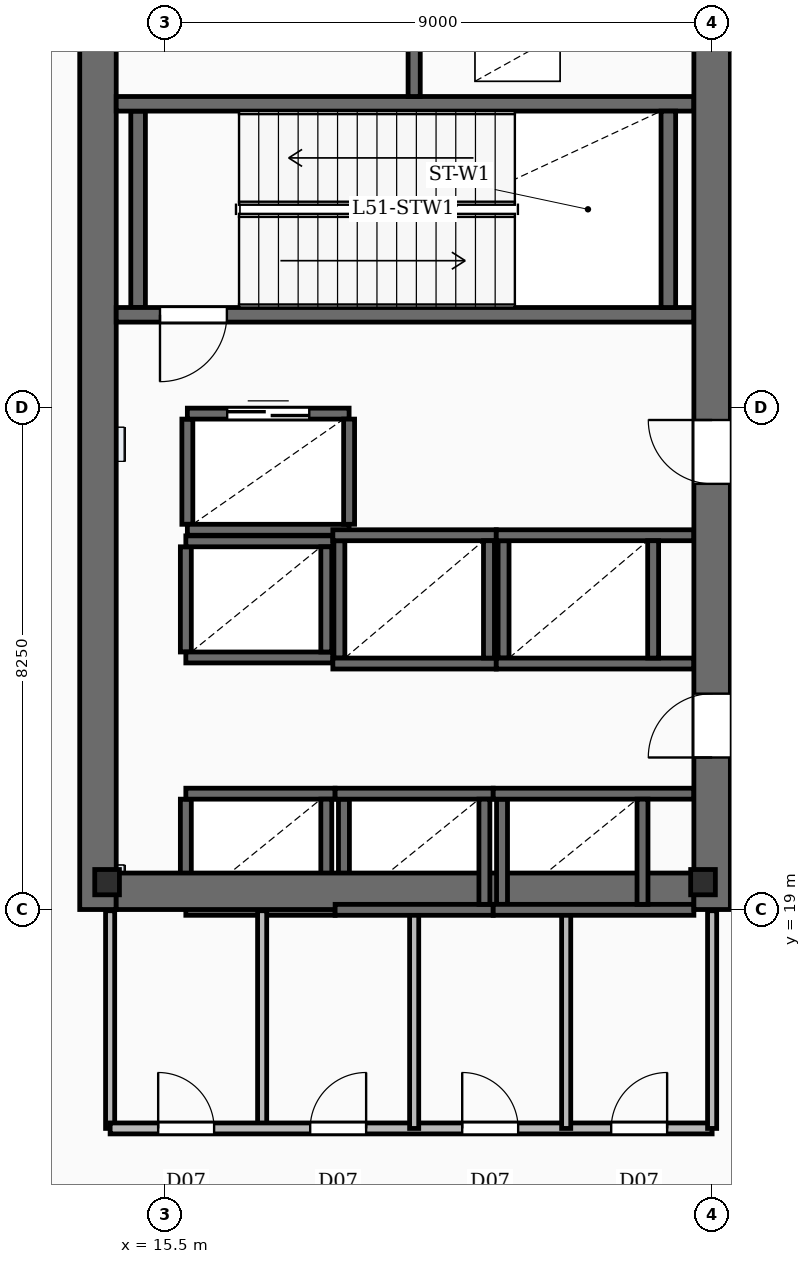
"""IFC4 building model, lengths in metres.
Left out: names, types, materials, properties, quantities, classifications, styles, units other than length and angle.
Written with IfcOpenShell. Run it as: python <this file> out.ifc"""

import sys

from ifc_helpers import new_model, si_unit, direction, frame, frame_2d, origin, origin_2d, place, context, subcontext, project, spatial, rectangle, i_section, extrude, element, fill, save


model = new_model("IFC4")
c1 = context("Model", 3, precision=1e-05, world=origin(), true_north=direction((0.0, 1.0)))
c2 = subcontext(c1, "Body", "Model", "MODEL_VIEW")
j1 = project(units=[si_unit("LENGTHUNIT", "METRE"), si_unit("PLANEANGLEUNIT", "RADIAN")], contexts=[c1])
p1 = place(None, origin())
s1 = spatial("IfcSite", under=j1, at=p1, CompositionType="ELEMENT")
p2 = place(p1, origin())
s2 = spatial("IfcBuilding", under=s1, at=p2, CompositionType="ELEMENT")
p3 = place(p2, frame((0.0, 0.0, 210.95)))
s3 = spatial("IfcBuildingStorey", under=s2, at=p3, CompositionType="ELEMENT", Elevation=210.95)
p4 = place(p3, frame((14.4, 19.0, -0.42), z_axis=(0.0, 0.0, 1.0), x_axis=(0.0, 1.0, 0.0)))
e1 = element("IfcWall", 1, at=p4, inside=s3, PredefinedType="SHEAR", context=c2, shape_type="SweptSolid", body=[
    extrude(rectangle(XDim=15.3, YDim=0.6, at=frame_2d((7.65, 0.0))), origin(), (0.0, 0.0, 1.0), 5.17),
])
p5 = place(p3, frame((24.5, 19.0, -0.42), z_axis=(0.0, 0.0, 1.0), x_axis=(0.0, 1.0, 0.0)))
e2 = element("IfcWall", 2, at=p5, inside=s3, PredefinedType="SHEAR", context=c2, shape_type="SweptSolid", body=[
    extrude(rectangle(XDim=15.3, YDim=0.6, at=frame_2d((7.65, 0.0))), origin(), (0.0, 0.0, 1.0), 5.17),
])
p6 = place(p5, frame((2.5, 0.0, 0.42)))
e3 = element("IfcOpeningElement", 3, at=p6, cuts=e2, PredefinedType="OPENING", context=c2, shape_type="SweptSolid", body=[
    extrude(rectangle(XDim=1.05, YDim=2.15, at=frame_2d((0.525, 1.075))), frame((0.0, 0.31, 0.0), z_axis=(0.0, -1.0, 0.0), x_axis=(1.0, 0.0, 0.0)), (0.0, 0.0, 1.0), 0.62),
])
p7 = place(p5, frame((7.0, 0.0, 0.42)))
e4 = element("IfcOpeningElement", 4, at=p7, cuts=e2, PredefinedType="OPENING", context=c2, shape_type="SweptSolid", body=[
    extrude(rectangle(XDim=1.05, YDim=2.15, at=frame_2d((0.525, 1.075))), frame((0.0, 0.31, 0.0), z_axis=(0.0, -1.0, 0.0), x_axis=(1.0, 0.0, 0.0)), (0.0, 0.0, 1.0), 0.62),
])
p8 = place(p3, frame((14.7, 19.3, -0.42), z_axis=(0.0, 0.0, 1.0), x_axis=(1.0, 0.0, 0.0)))
e5 = element("IfcWall", 5, at=p8, inside=s3, PredefinedType="SHEAR", context=c2, shape_type="SweptSolid", body=[
    extrude(rectangle(XDim=9.5, YDim=0.6, at=frame_2d((4.75, 0.0))), origin(), (0.0, 0.0, 1.0), 5.17),
])
for number, where, z_axis, x_axis in (
    (6, (14.55, 19.45, -0.42), (0.0, 0.0, 1.0), (1.0, 0.0, 0.0)),
    (7, (24.35, 19.45, -0.42), (0.0, 0.0, 1.0), (1.0, 0.0, 0.0)),
):
    element("IfcColumn", number, at=place(p3, frame(where, z_axis=z_axis, x_axis=x_axis)), inside=s3, PredefinedType="COLUMN", context=c2, shape_type="SweptSolid", body=[
        extrude(i_section(OverallWidth=0.406, OverallDepth=0.416, WebThickness=0.03, FlangeThickness=0.048, FilletRadius=0.02, at=origin_2d()), origin(), (0.0, 0.0, 1.0), 5.17),
    ])
p9 = place(p3, frame((24.2, 28.78, 0.0), z_axis=(0.0, 0.0, 1.0), x_axis=(-1.0, 0.0, 0.0)))
e8 = element("IfcWall", 8, at=p9, inside=s3, PredefinedType="SOLIDWALL", context=c2, shape_type="SweptSolid", body=[
    extrude(rectangle(XDim=9.5, YDim=0.24, at=frame_2d((4.75, 0.0))), origin(), (0.0, 0.0, 1.0), 4.75),
])
p10 = place(p9, frame((7.68, 0.0, 0.0)))
e9 = element("IfcOpeningElement", 9, at=p10, cuts=e8, PredefinedType="OPENING", context=c2, shape_type="SweptSolid", body=[
    extrude(rectangle(XDim=1.1, YDim=2.15, at=frame_2d((0.55, 1.075))), frame((0.0, 0.13, 0.0), z_axis=(0.0, -1.0, 0.0), x_axis=(1.0, 0.0, 0.0)), (0.0, 0.0, 1.0), 0.26),
])
p11 = place(p3, frame((14.7, 32.25, 0.0), z_axis=(0.0, 0.0, 1.0), x_axis=(1.0, 0.0, 0.0)))
e10 = element("IfcWall", 10, at=p11, inside=s3, PredefinedType="SOLIDWALL", context=c2, shape_type="SweptSolid", body=[
    extrude(rectangle(XDim=9.5, YDim=0.24, at=frame_2d((4.75, 0.0))), origin(), (0.0, 0.0, 1.0), 4.75),
])
for number, where, z_axis, x_axis in (
    (11, (15.06, 28.9, 0.0), (0.0, 0.0, 1.0), (0.0, 1.0, 0.0)),
    (12, (23.78, 28.9, 0.0), (0.0, 0.0, 1.0), (0.0, 1.0, 0.0)),
):
    element("IfcWall", number, at=place(p3, frame(where, z_axis=z_axis, x_axis=x_axis)), inside=s3, PredefinedType="SOLIDWALL", context=c2, shape_type="SweptSolid", body=[
        extrude(rectangle(XDim=3.23, YDim=0.24, at=frame_2d((1.615, 0.0))), origin(), (0.0, 0.0, 1.0), 4.75),
    ])
p12 = place(p3, frame((19.6, 32.37, 0.0), z_axis=(0.0, 0.0, 1.0), x_axis=(0.0, 1.0, 0.0)))
e13 = element("IfcWall", 13, at=p12, inside=s3, PredefinedType="SOLIDWALL", context=c2, shape_type="SweptSolid", body=[
    extrude(rectangle(XDim=1.28, YDim=0.2, at=frame_2d((0.64, 0.0))), origin(), (0.0, 0.0, 1.0), 4.75),
])
for number, where, z_axis, x_axis in (
    (14, (15.845, 20.905, 0.0), (0.0, 0.0, 1.0), (1.0, 0.0, 0.0)),
    (15, (15.845, 18.995, 0.0), (0.0, 0.0, 1.0), (1.0, 0.0, 0.0)),
):
    element("IfcWall", number, at=place(p3, frame(where, z_axis=z_axis, x_axis=x_axis)), inside=s3, PredefinedType="SOLIDWALL", context=c2, shape_type="SweptSolid", body=[
        extrude(rectangle(XDim=2.455, YDim=0.18, at=frame_2d((1.228, 0.0))), origin(), (0.0, 0.0, 1.0), 4.75),
    ])
for number, where, z_axis, x_axis in (
    (16, (15.845, 19.085, 0.0), (0.0, 0.0, 1.0), (0.0, 1.0, 0.0)),
    (17, (18.155, 19.085, 0.0), (0.0, 0.0, 1.0), (0.0, 1.0, 0.0)),
):
    element("IfcWall", number, at=place(p3, frame(where, z_axis=z_axis, x_axis=x_axis)), inside=s3, PredefinedType="SOLIDWALL", context=c2, shape_type="SweptSolid", body=[
        extrude(rectangle(XDim=1.73, YDim=0.18, at=frame_2d((0.865, 0.0))), origin(), (0.0, 0.0, 1.0), 4.75),
    ])
for number, where, z_axis, x_axis in (
    (18, (18.3, 20.905, 0.0), (0.0, 0.0, 1.0), (1.0, 0.0, 0.0)),
    (19, (18.3, 18.995, 0.0), (0.0, 0.0, 1.0), (1.0, 0.0, 0.0)),
):
    element("IfcWall", number, at=place(p3, frame(where, z_axis=z_axis, x_axis=x_axis)), inside=s3, PredefinedType="SOLIDWALL", context=c2, shape_type="SweptSolid", body=[
        extrude(rectangle(XDim=2.6, YDim=0.18, at=frame_2d((1.3, 0.0))), origin(), (0.0, 0.0, 1.0), 4.75),
    ])
for number, where, z_axis, x_axis in (
    (20, (18.445, 19.085, 0.0), (0.0, 0.0, 1.0), (0.0, 1.0, 0.0)),
    (21, (20.755, 19.085, 0.0), (0.0, 0.0, 1.0), (0.0, 1.0, 0.0)),
):
    element("IfcWall", number, at=place(p3, frame(where, z_axis=z_axis, x_axis=x_axis)), inside=s3, PredefinedType="SOLIDWALL", context=c2, shape_type="SweptSolid", body=[
        extrude(rectangle(XDim=1.73, YDim=0.18, at=frame_2d((0.865, 0.0))), origin(), (0.0, 0.0, 1.0), 4.75),
    ])
for number, where, z_axis, x_axis in (
    (22, (20.9, 20.905, 0.0), (0.0, 0.0, 1.0), (1.0, 0.0, 0.0)),
    (23, (20.9, 18.995, 0.0), (0.0, 0.0, 1.0), (1.0, 0.0, 0.0)),
):
    element("IfcWall", number, at=place(p3, frame(where, z_axis=z_axis, x_axis=x_axis)), inside=s3, PredefinedType="SOLIDWALL", context=c2, shape_type="SweptSolid", body=[
        extrude(rectangle(XDim=3.3, YDim=0.18, at=frame_2d((1.65, 0.0))), origin(), (0.0, 0.0, 1.0), 4.75),
    ])
for number, where, z_axis, x_axis in (
    (24, (21.045, 19.085, 0.0), (0.0, 0.0, 1.0), (0.0, 1.0, 0.0)),
    (25, (23.355, 19.085, 0.0), (0.0, 0.0, 1.0), (0.0, 1.0, 0.0)),
):
    element("IfcWall", number, at=place(p3, frame(where, z_axis=z_axis, x_axis=x_axis)), inside=s3, PredefinedType="SOLIDWALL", context=c2, shape_type="SweptSolid", body=[
        extrude(rectangle(XDim=1.73, YDim=0.18, at=frame_2d((0.865, 0.0))), origin(), (0.0, 0.0, 1.0), 4.75),
    ])
for number, where, z_axis, x_axis in (
    (26, (15.845, 25.055, 0.0), (0.0, 0.0, 1.0), (1.0, 0.0, 0.0)),
    (27, (15.845, 23.145, 0.0), (0.0, 0.0, 1.0), (1.0, 0.0, 0.0)),
):
    element("IfcWall", number, at=place(p3, frame(where, z_axis=z_axis, x_axis=x_axis)), inside=s3, PredefinedType="SOLIDWALL", context=c2, shape_type="SweptSolid", body=[
        extrude(rectangle(XDim=2.417, YDim=0.18, at=frame_2d((1.209, 0.0))), origin(), (0.0, 0.0, 1.0), 4.75),
    ])
for number, where, z_axis, x_axis in (
    (28, (15.845, 23.235, 0.0), (0.0, 0.0, 1.0), (0.0, 1.0, 0.0)),
    (29, (18.155, 23.235, 0.0), (0.0, 0.0, 1.0), (0.0, 1.0, 0.0)),
):
    element("IfcWall", number, at=place(p3, frame(where, z_axis=z_axis, x_axis=x_axis)), inside=s3, PredefinedType="SOLIDWALL", context=c2, shape_type="SweptSolid", body=[
        extrude(rectangle(XDim=1.73, YDim=0.18, at=frame_2d((0.865, 0.0))), origin(), (0.0, 0.0, 1.0), 4.75),
    ])
for number, where, z_axis, x_axis in (
    (30, (18.262, 25.155, 0.0), (0.0, 0.0, 1.0), (1.0, 0.0, 0.0)),
    (31, (18.262, 23.045, 0.0), (0.0, 0.0, 1.0), (1.0, 0.0, 0.0)),
):
    element("IfcWall", number, at=place(p3, frame(where, z_axis=z_axis, x_axis=x_axis)), inside=s3, PredefinedType="SOLIDWALL", context=c2, shape_type="SweptSolid", body=[
        extrude(rectangle(XDim=2.688, YDim=0.18, at=frame_2d((1.344, 0.0))), origin(), (0.0, 0.0, 1.0), 4.75),
    ])
for number, where, z_axis, x_axis in (
    (32, (18.37, 23.135, 0.0), (0.0, 0.0, 1.0), (0.0, 1.0, 0.0)),
    (33, (20.83, 23.135, 0.0), (0.0, 0.0, 1.0), (0.0, 1.0, 0.0)),
):
    element("IfcWall", number, at=place(p3, frame(where, z_axis=z_axis, x_axis=x_axis)), inside=s3, PredefinedType="SOLIDWALL", context=c2, shape_type="SweptSolid", body=[
        extrude(rectangle(XDim=1.93, YDim=0.18, at=frame_2d((0.965, 0.0))), origin(), (0.0, 0.0, 1.0), 4.75),
    ])
for number, where, z_axis, x_axis in (
    (34, (20.95, 25.155, 0.0), (0.0, 0.0, 1.0), (1.0, 0.0, 0.0)),
    (35, (20.95, 23.045, 0.0), (0.0, 0.0, 1.0), (1.0, 0.0, 0.0)),
):
    element("IfcWall", number, at=place(p3, frame(where, z_axis=z_axis, x_axis=x_axis)), inside=s3, PredefinedType="SOLIDWALL", context=c2, shape_type="SweptSolid", body=[
        extrude(rectangle(XDim=3.25, YDim=0.18, at=frame_2d((1.625, 0.0))), origin(), (0.0, 0.0, 1.0), 4.75),
    ])
for number, where, z_axis, x_axis in (
    (36, (21.07, 23.135, 0.0), (0.0, 0.0, 1.0), (0.0, 1.0, 0.0)),
    (37, (23.53, 23.135, 0.0), (0.0, 0.0, 1.0), (0.0, 1.0, 0.0)),
):
    element("IfcWall", number, at=place(p3, frame(where, z_axis=z_axis, x_axis=x_axis)), inside=s3, PredefinedType="SOLIDWALL", context=c2, shape_type="SweptSolid", body=[
        extrude(rectangle(XDim=1.93, YDim=0.18, at=frame_2d((0.965, 0.0))), origin(), (0.0, 0.0, 1.0), 4.75),
    ])
p13 = place(p3, frame((15.87, 27.155, 0.0), z_axis=(0.0, 0.0, 1.0), x_axis=(1.0, 0.0, 0.0)))
e38 = element("IfcWall", 38, at=p13, inside=s3, PredefinedType="SOLIDWALL", context=c2, shape_type="SweptSolid", body=[
    extrude(rectangle(XDim=2.66, YDim=0.18, at=frame_2d((1.33, 0.0))), origin(), (0.0, 0.0, 1.0), 4.75),
])
p14 = place(p13, frame((0.655, 0.0, 0.0)))
e39 = element("IfcOpeningElement", 39, at=p14, cuts=e38, PredefinedType="OPENING", context=c2, shape_type="SweptSolid", body=[
    extrude(rectangle(XDim=1.35, YDim=2.3, at=frame_2d((0.675, 1.15))), frame((0.0, 0.1, 0.0), z_axis=(0.0, -1.0, 0.0), x_axis=(1.0, 0.0, 0.0)), (0.0, 0.0, 1.0), 0.2),
])
p15 = place(p3, frame((15.87, 25.245, 0.0), z_axis=(0.0, 0.0, 1.0), x_axis=(1.0, 0.0, 0.0)))
e40 = element("IfcWall", 40, at=p15, inside=s3, PredefinedType="SOLIDWALL", context=c2, shape_type="SweptSolid", body=[
    extrude(rectangle(XDim=2.66, YDim=0.18, at=frame_2d((1.33, 0.0))), origin(), (0.0, 0.0, 1.0), 4.75),
])
for number, where, z_axis, x_axis in (
    (41, (15.87, 25.335, 0.0), (0.0, 0.0, 1.0), (0.0, 1.0, 0.0)),
    (42, (18.53, 25.335, 0.0), (0.0, 0.0, 1.0), (0.0, 1.0, 0.0)),
):
    element("IfcWall", number, at=place(p3, frame(where, z_axis=z_axis, x_axis=x_axis)), inside=s3, PredefinedType="SOLIDWALL", context=c2, shape_type="SweptSolid", body=[
        extrude(rectangle(XDim=1.73, YDim=0.18, at=frame_2d((0.865, 0.0))), origin(), (0.0, 0.0, 1.0), 4.75),
    ])
for number, where, z_axis, x_axis in (
    (43, (17.1, 15.4, 0.0), (0.0, 0.0, 1.0), (0.0, 1.0, 0.0)),
    (44, (19.6, 15.4, 0.0), (0.0, 0.0, 1.0), (0.0, 1.0, 0.0)),
    (45, (22.1, 15.4, 0.0), (0.0, 0.0, 1.0), (0.0, 1.0, 0.0)),
):
    element("IfcWall", number, at=place(p3, frame(where, z_axis=z_axis, x_axis=x_axis)), inside=s3, PredefinedType="PARTITIONING", context=c2, shape_type="SweptSolid", body=[
        extrude(rectangle(XDim=3.58, YDim=0.15, at=frame_2d((1.79, 0.0))), origin(), (0.0, 0.0, 1.0), 3.81),
    ])
p16 = place(p3, frame((14.6, 15.4, 0.0), z_axis=(0.0, 0.0, 1.0), x_axis=(1.0, 0.0, 0.0)))
e46 = element("IfcWall", 46, at=p16, inside=s3, PredefinedType="PARTITIONING", context=c2, shape_type="SweptSolid", body=[
    extrude(rectangle(XDim=9.9, YDim=0.18, at=frame_2d((4.95, 0.0))), origin(), (0.0, 0.0, 1.0), 3.81),
])
p17 = place(p16, frame((0.79, 0.0, 0.0)))
e47 = element("IfcOpeningElement", 47, at=p17, cuts=e46, PredefinedType="OPENING", context=c2, shape_type="SweptSolid", body=[
    extrude(rectangle(XDim=0.92, YDim=2.1, at=frame_2d((0.46, 1.05))), frame((0.0, 0.1, 0.0), z_axis=(0.0, -1.0, 0.0), x_axis=(1.0, 0.0, 0.0)), (0.0, 0.0, 1.0), 0.2),
])
p18 = place(p16, frame((3.29, 0.0, 0.0)))
e48 = element("IfcOpeningElement", 48, at=p18, cuts=e46, PredefinedType="OPENING", context=c2, shape_type="SweptSolid", body=[
    extrude(rectangle(XDim=0.92, YDim=2.1, at=frame_2d((0.46, 1.05))), frame((0.0, 0.1, 0.0), z_axis=(0.0, -1.0, 0.0), x_axis=(1.0, 0.0, 0.0)), (0.0, 0.0, 1.0), 0.2),
])
p19 = place(p16, frame((5.79, 0.0, 0.0)))
e49 = element("IfcOpeningElement", 49, at=p19, cuts=e46, PredefinedType="OPENING", context=c2, shape_type="SweptSolid", body=[
    extrude(rectangle(XDim=0.92, YDim=2.1, at=frame_2d((0.46, 1.05))), frame((0.0, 0.1, 0.0), z_axis=(0.0, -1.0, 0.0), x_axis=(1.0, 0.0, 0.0)), (0.0, 0.0, 1.0), 0.2),
])
p20 = place(p16, frame((8.24, 0.0, 0.0)))
e50 = element("IfcOpeningElement", 50, at=p20, cuts=e46, PredefinedType="OPENING", context=c2, shape_type="SweptSolid", body=[
    extrude(rectangle(XDim=0.92, YDim=2.1, at=frame_2d((0.46, 1.05))), frame((0.0, 0.1, 0.0), z_axis=(0.0, -1.0, 0.0), x_axis=(1.0, 0.0, 0.0)), (0.0, 0.0, 1.0), 0.2),
])
for number, where, z_axis, x_axis in (
    (51, (14.6, 15.4, 0.0), (0.0, 0.0, 1.0), (0.0, 1.0, 0.0)),
    (52, (24.5, 15.4, 0.0), (0.0, 0.0, 1.0), (0.0, 1.0, 0.0)),
):
    element("IfcWall", number, at=place(p3, frame(where, z_axis=z_axis, x_axis=x_axis)), inside=s3, PredefinedType="PARTITIONING", context=c2, shape_type="SweptSolid", body=[
        extrude(rectangle(XDim=3.58, YDim=0.15, at=frame_2d((1.79, 0.0))), origin(), (0.0, 0.0, 1.0), 2.8),
    ])
p21 = place(p6, origin())
e53 = element("IfcDoor", 53, at=p21, inside=s3, OperationType="SINGLE_SWING_LEFT", PredefinedType="DOOR", context=c2, shape_type="SweptSolid", body=[
    extrude(rectangle(XDim=1.05, YDim=2.15, at=frame_2d((0.525, 1.075))), frame((0.0, 0.025, 0.0), z_axis=(0.0, -1.0, 0.0), x_axis=(1.0, 0.0, 0.0)), (0.0, 0.0, 1.0), 0.05),
])
fill(e3, e53)
p22 = place(p7, origin())
e54 = element("IfcDoor", 54, at=p22, inside=s3, OperationType="SINGLE_SWING_RIGHT", PredefinedType="DOOR", context=c2, shape_type="SweptSolid", body=[
    extrude(rectangle(XDim=1.05, YDim=2.15, at=frame_2d((0.525, 1.075))), frame((0.0, 0.025, 0.0), z_axis=(0.0, -1.0, 0.0), x_axis=(1.0, 0.0, 0.0)), (0.0, 0.0, 1.0), 0.05),
])
fill(e4, e54)
p23 = place(p10, origin())
e55 = element("IfcDoor", 55, at=p23, inside=s3, OperationType="SINGLE_SWING_RIGHT", PredefinedType="DOOR", context=c2, shape_type="SweptSolid", body=[
    extrude(rectangle(XDim=1.1, YDim=2.15, at=frame_2d((0.55, 1.075))), frame((0.0, 0.025, 0.0), z_axis=(0.0, -1.0, 0.0), x_axis=(1.0, 0.0, 0.0)), (0.0, 0.0, 1.0), 0.05),
])
fill(e9, e55)
p24 = place(p14, origin())
e56 = element("IfcDoor", 56, at=p24, inside=s3, OperationType="DOUBLE_DOOR_SLIDING", PredefinedType="DOOR", context=c2, shape_type="SweptSolid", body=[
    extrude(rectangle(XDim=1.35, YDim=2.3, at=frame_2d((0.675, 1.15))), frame((0.0, 0.025, 0.0), z_axis=(0.0, -1.0, 0.0), x_axis=(1.0, 0.0, 0.0)), (0.0, 0.0, 1.0), 0.05),
])
fill(e39, e56)
p25 = place(p17, origin())
e57 = element("IfcDoor", 57, at=p25, inside=s3, OperationType="SINGLE_SWING_LEFT", PredefinedType="DOOR", context=c2, shape_type="SweptSolid", body=[
    extrude(rectangle(XDim=0.92, YDim=2.1, at=frame_2d((0.46, 1.05))), frame((0.0, 0.025, 0.0), z_axis=(0.0, -1.0, 0.0), x_axis=(1.0, 0.0, 0.0)), (0.0, 0.0, 1.0), 0.05),
])
fill(e47, e57)
p26 = place(p18, origin())
e58 = element("IfcDoor", 58, at=p26, inside=s3, OperationType="SINGLE_SWING_RIGHT", PredefinedType="DOOR", context=c2, shape_type="SweptSolid", body=[
    extrude(rectangle(XDim=0.92, YDim=2.1, at=frame_2d((0.46, 1.05))), frame((0.0, 0.025, 0.0), z_axis=(0.0, -1.0, 0.0), x_axis=(1.0, 0.0, 0.0)), (0.0, 0.0, 1.0), 0.05),
])
fill(e48, e58)
p27 = place(p19, origin())
e59 = element("IfcDoor", 59, at=p27, inside=s3, OperationType="SINGLE_SWING_LEFT", PredefinedType="DOOR", context=c2, shape_type="SweptSolid", body=[
    extrude(rectangle(XDim=0.92, YDim=2.1, at=frame_2d((0.46, 1.05))), frame((0.0, 0.025, 0.0), z_axis=(0.0, -1.0, 0.0), x_axis=(1.0, 0.0, 0.0)), (0.0, 0.0, 1.0), 0.05),
])
fill(e49, e59)
p28 = place(p20, origin())
e60 = element("IfcDoor", 60, at=p28, inside=s3, OperationType="SINGLE_SWING_RIGHT", PredefinedType="DOOR", context=c2, shape_type="SweptSolid", body=[
    extrude(rectangle(XDim=0.92, YDim=2.1, at=frame_2d((0.46, 1.05))), frame((0.0, 0.025, 0.0), z_axis=(0.0, -1.0, 0.0), x_axis=(1.0, 0.0, 0.0)), (0.0, 0.0, 1.0), 0.05),
])
fill(e50, e60)
save(model, sys.argv[1])
